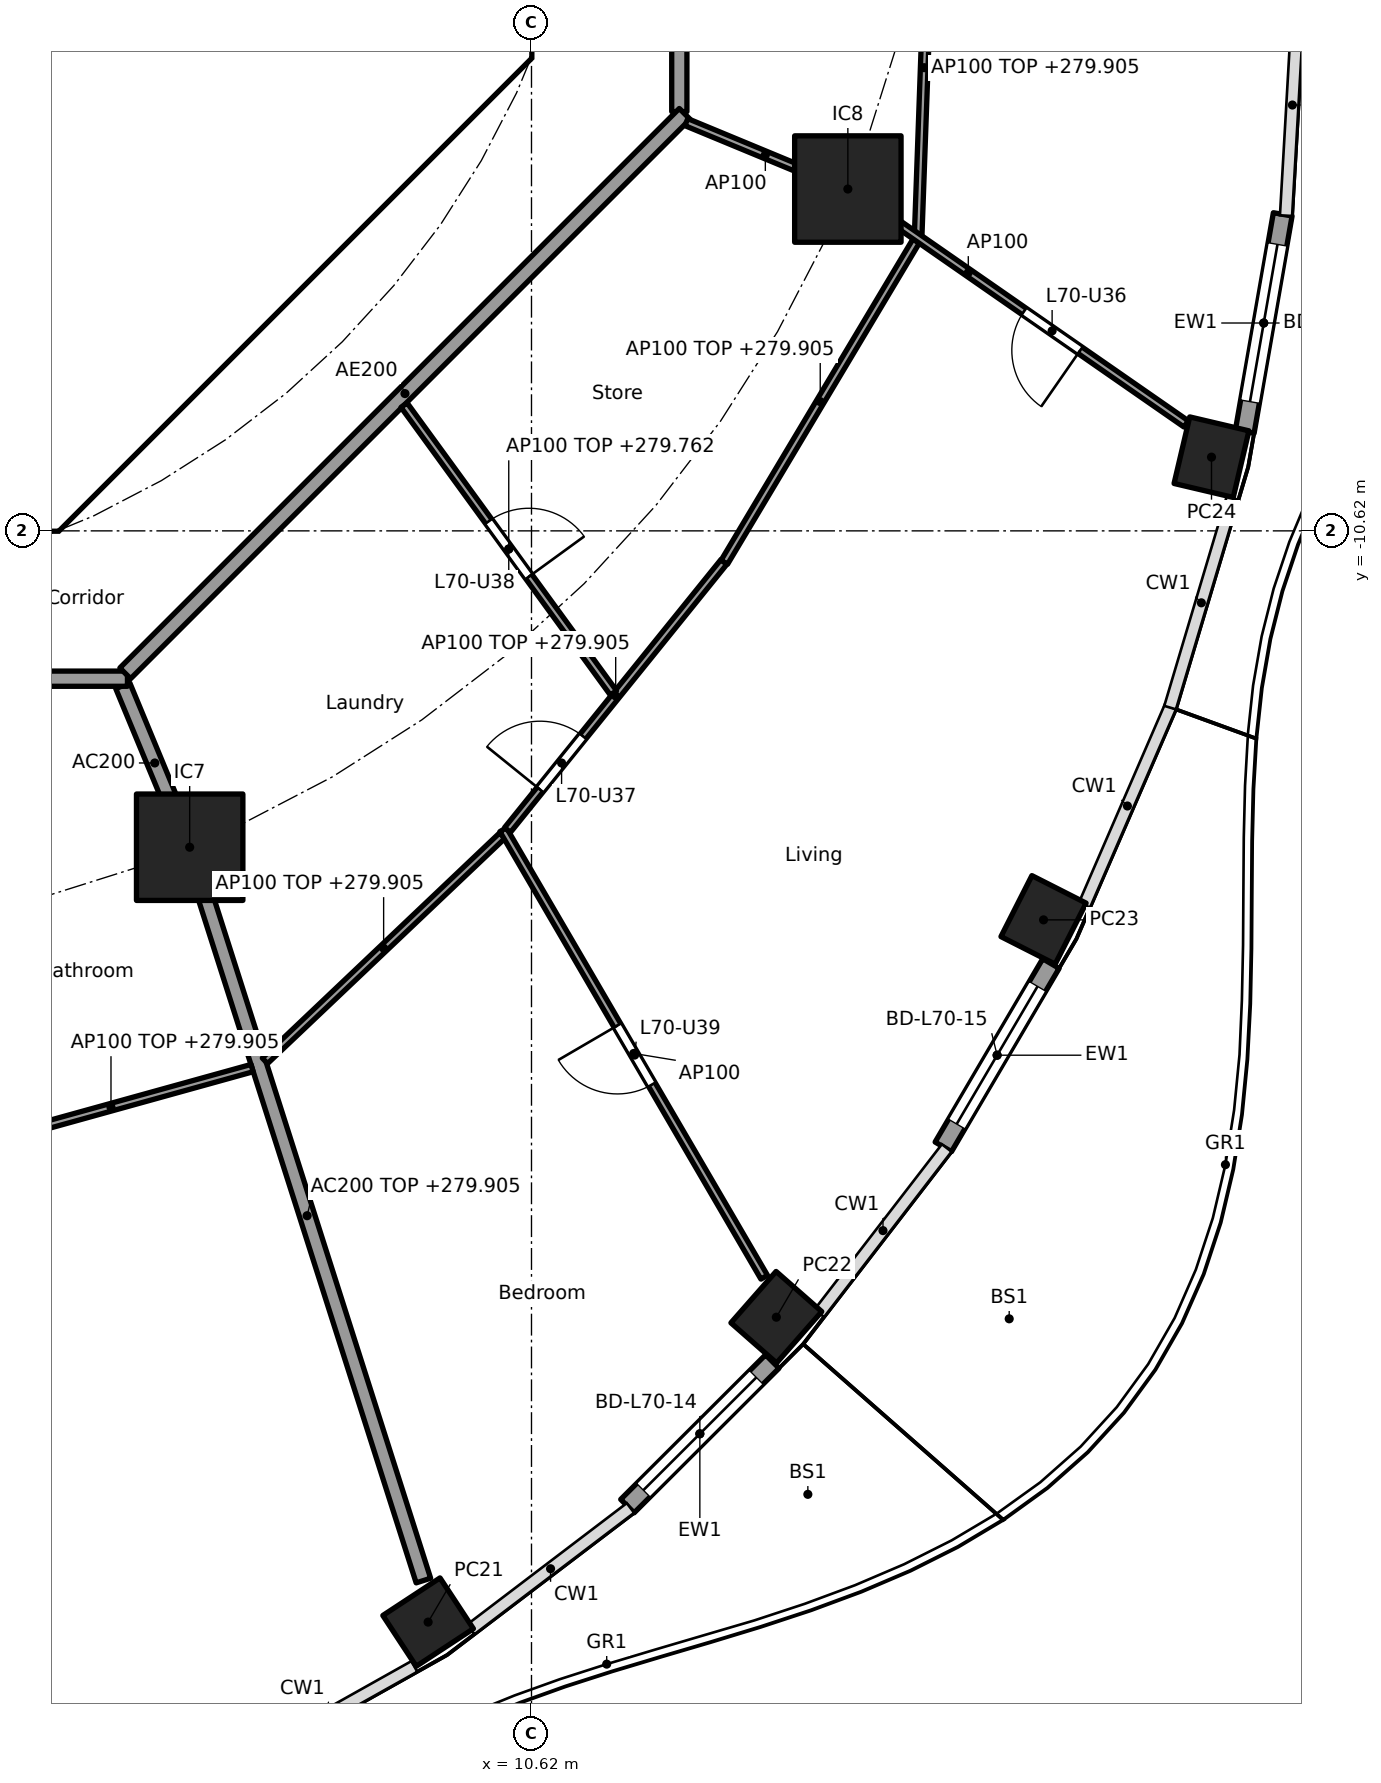
"""IFC4 building model, lengths in metres.
Left out: names, types, materials, properties, quantities, classifications, styles, units other than length and angle.
Written with IfcOpenShell. Run it as: python <this file> out.ifc"""

import sys

from ifc_helpers import new_model, si_unit, direction, frame, frame_2d, origin, origin_2d, place, context, subcontext, project, spatial, polyline, rectangle, hollow_rectangle, outline, extrude, element, fill, save


model = new_model("IFC4")
c1 = context("Model", 3, precision=1e-05, world=origin(), true_north=direction((0.0, 1.0)))
c2 = subcontext(c1, "Body", "Model", "MODEL_VIEW")
j1 = project(units=[si_unit("LENGTHUNIT", "METRE"), si_unit("PLANEANGLEUNIT", "RADIAN")], contexts=[c1])
p1 = place(None, origin())
s1 = spatial("IfcSite", under=j1, at=p1, CompositionType="ELEMENT")
p2 = place(p1, origin())
s2 = spatial("IfcBuilding", under=s1, at=p2, CompositionType="ELEMENT")
p3 = place(p2, frame((0.0, 0.0, 277.0)))
s3 = spatial("IfcBuildingStorey", under=s2, at=p3, CompositionType="ELEMENT", Elevation=277.0)
for number, where, z_axis, x_axis in (
    (1, (9.26, -24.976, 0.0), (0.0, 0.0, 1.0), (0.836, 0.549, 0.0)),
    (2, (13.841, -20.965, 0.0), (0.0, 0.0, 1.0), (0.66, 0.751, 0.0)),
    (3, (17.356, -15.738, 0.0), (0.0, 0.0, 1.0), (0.452, 0.892, 0.0)),
    (4, (19.566, -9.65, 0.0), (0.0, 0.0, 1.0), (0.229, 0.973, 0.0)),
):
    element("IfcColumn", number, at=place(p3, frame(where, z_axis=z_axis, x_axis=x_axis)), inside=s3, PredefinedType="COLUMN", context=c2, shape_type="SweptSolid", body=[
        extrude(hollow_rectangle(XDim=0.9, YDim=0.8, WallThickness=0.028, at=origin_2d()), origin(), (0.0, 0.0, 1.0), 3.7),
    ])
for number, where, z_axis, x_axis in (
    (5, (6.123, -14.782, 0.0), (0.0, 0.0, 1.0), (1.0, 0.0, 0.0)),
    (6, (14.782, -6.123, 0.0), (0.0, 0.0, 1.0), (1.0, 0.0, 0.0)),
):
    element("IfcColumn", number, at=place(p3, frame(where, z_axis=z_axis, x_axis=x_axis)), inside=s3, PredefinedType="COLUMN", context=c2, shape_type="SweptSolid", body=[
        extrude(rectangle(XDim=1.4, YDim=1.4, at=origin_2d()), origin(), (0.0, 0.0, 1.0), 3.7),
    ])
p4 = place(p3, frame((13.788, -21.548, 0.0), z_axis=(0.0, 0.0, 1.0), x_axis=(-0.707831739508, -0.706381078841, 0.0)))
e7 = element("IfcWall", 7, at=p4, inside=s3, PredefinedType="SOLIDWALL", context=c2, shape_type="SweptSolid", body=[
    extrude(rectangle(XDim=2.693, YDim=0.25, at=frame_2d((1.346, 0.0))), origin(), (0.0, 0.0, 1.0), 3.44),
])
p5 = place(p4, frame((0.296, 0.0, 0.0)))
e8 = element("IfcOpeningElement", 8, at=p5, cuts=e7, PredefinedType="OPENING", context=c2, shape_type="SweptSolid", body=[
    extrude(rectangle(XDim=2.1, YDim=2.4, at=frame_2d((1.05, 1.2))), frame((0.0, 0.135, 0.0), z_axis=(0.0, -1.0, 0.0), x_axis=(1.0, 0.0, 0.0)), (0.0, 0.0, 1.0), 0.27),
])
p6 = place(p3, frame((17.454, -16.312, 0.0), z_axis=(0.0, 0.0, 1.0), x_axis=(-0.506371364425, -0.862315511452, 0.0)))
e9 = element("IfcWall", 9, at=p6, inside=s3, PredefinedType="SOLIDWALL", context=c2, shape_type="SweptSolid", body=[
    extrude(rectangle(XDim=2.796, YDim=0.25, at=frame_2d((1.398, 0.0))), origin(), (0.0, 0.0, 1.0), 3.44),
])
p7 = place(p6, frame((0.348, 0.0, 0.0)))
e10 = element("IfcOpeningElement", 10, at=p7, cuts=e9, PredefinedType="OPENING", context=c2, shape_type="SweptSolid", body=[
    extrude(rectangle(XDim=2.1, YDim=2.4, at=frame_2d((1.05, 1.2))), frame((0.0, 0.135, 0.0), z_axis=(0.0, -1.0, 0.0), x_axis=(1.0, 0.0, 0.0)), (0.0, 0.0, 1.0), 0.27),
])
p8 = place(p3, frame((20.503, -6.456, 0.0), z_axis=(0.0, 0.0, 1.0), x_axis=(-0.172182411767, -0.985065082661, 0.0)))
e11 = element("IfcWall", 11, at=p8, inside=s3, PredefinedType="SOLIDWALL", context=c2, shape_type="SweptSolid", body=[
    extrude(rectangle(XDim=2.903, YDim=0.25, at=frame_2d((1.451, 0.0))), origin(), (0.0, 0.0, 1.0), 3.44),
])
p9 = place(p8, frame((0.401, 0.0, 0.0)))
e12 = element("IfcOpeningElement", 12, at=p9, cuts=e11, PredefinedType="OPENING", context=c2, shape_type="SweptSolid", body=[
    extrude(rectangle(XDim=2.1, YDim=2.4, at=frame_2d((1.05, 1.2))), frame((0.0, 0.135, 0.0), z_axis=(0.0, -1.0, 0.0), x_axis=(1.0, 0.0, 0.0)), (0.0, 0.0, 1.0), 0.27),
])
p10 = place(p3, frame((4.613, -9.988, 0.0), z_axis=(0.0, 0.0, 1.0), x_axis=(0.707106781187, 0.707106781187, 0.0)))
e13 = element("IfcWall", 13, at=p10, inside=s3, PredefinedType="SHEAR", context=c2, shape_type="SweptSolid", body=[
    extrude(rectangle(XDim=7.602, YDim=0.6, at=frame_2d((3.801, 0.0))), origin(), (0.0, 0.0, 1.0), 3.44),
])
p11 = place(p10, frame((3.201, 0.0, 0.0)))
e14 = element("IfcOpeningElement", 14, at=p11, cuts=e13, PredefinedType="OPENING", context=c2, shape_type="SweptSolid", body=[
    extrude(rectangle(XDim=1.2, YDim=2.1, at=frame_2d((0.6, 1.05))), frame((0.0, 0.31, 0.0), z_axis=(0.0, -1.0, 0.0), x_axis=(1.0, 0.0, 0.0)), (0.0, 0.0, 1.0), 0.62),
])
p12 = place(p3, origin())
e15 = element("IfcWall", 15, at=p12, inside=s3, PredefinedType="SHEAR", context=c2, shape_type="SweptSolid", body=[
    extrude(outline(polyline([(-4.152, -10.025), (4.152, -10.025), (4.401, -9.776), (4.825, -10.2), (4.401, -10.625), (-4.401, -10.625), (-4.825, -10.2), (-4.401, -9.776), (-4.152, -10.025)])), origin(), (0.0, 0.0, 1.0), 3.44),
])
p13 = place(p3, origin())
e16 = element("IfcWall", 16, at=p13, inside=s3, PredefinedType="SHEAR", context=c2, shape_type="SweptSolid", body=[
    extrude(outline(polyline([(9.776, -4.401), (10.025, -4.152), (10.025, -3.801), (10.025, 4.152), (9.776, 4.401), (10.2, 4.825), (10.625, 4.401), (10.625, -4.401), (10.2, -4.825), (9.776, -4.401)])), origin(), (0.0, 0.0, 1.0), 3.44),
])
p14 = place(p3, frame((5.243, -12.657, 0.0), z_axis=(0.0, 0.0, 1.0), x_axis=(0.382707856524, -0.923869415315, 0.0)))
e17 = element("IfcWall", 17, at=p14, inside=s3, PredefinedType="PARTITIONING", context=c2, shape_type="SweptSolid", body=[
    extrude(rectangle(XDim=2.2, YDim=0.2, at=frame_2d((1.1, 0.0))), origin(), (0.0, 0.0, 1.0), 3.44),
])
p15 = place(p3, frame((6.138, -14.83, 0.0), z_axis=(0.0, 0.0, 1.0), x_axis=(0.303653679037, -0.952782474234, 0.0)))
e18 = element("IfcWall", 18, at=p15, inside=s3, PredefinedType="PARTITIONING", context=c2, shape_type="SweptSolid", body=[
    extrude(rectangle(XDim=10.076, YDim=0.2, at=frame_2d((5.038, 0.0))), origin(), (0.0, 0.0, 1.0), 2.905),
])
p16 = place(p3, frame((12.565, -5.104, 0.0), z_axis=(0.0, 0.0, 1.0), x_axis=(0.0, 1.0, 0.0)))
e19 = element("IfcWall", 19, at=p16, inside=s3, PredefinedType="PARTITIONING", context=c2, shape_type="SweptSolid", body=[
    extrude(rectangle(XDim=10.209, YDim=0.2, at=frame_2d((5.104, 0.0))), origin(), (0.0, 0.0, 1.0), 3.44),
])
p17 = place(p16, frame((4.604, 0.0, 0.0)))
e20 = element("IfcOpeningElement", 20, at=p17, cuts=e19, PredefinedType="OPENING", context=c2, shape_type="SweptSolid", body=[
    extrude(rectangle(XDim=1.0, YDim=2.1, at=frame_2d((0.5, 1.05))), frame((0.0, 0.11, 0.0), z_axis=(0.0, -1.0, 0.0), x_axis=(1.0, 0.0, 0.0)), (0.0, 0.0, 1.0), 0.22),
])
p18 = place(p3, frame((-5.104, -12.565, 0.0), z_axis=(0.0, 0.0, 1.0), x_axis=(1.0, 0.0, 0.0)))
e21 = element("IfcWall", 21, at=p18, inside=s3, PredefinedType="PARTITIONING", context=c2, shape_type="SweptSolid", body=[
    extrude(rectangle(XDim=10.409, YDim=0.2, at=frame_2d((5.205, 0.0))), origin(), (0.0, 0.0, 1.0), 3.44),
])
p19 = place(p18, frame((5.906, 0.0, 0.0)))
e22 = element("IfcOpeningElement", 22, at=p19, cuts=e21, PredefinedType="OPENING", context=c2, shape_type="SweptSolid", body=[
    extrude(rectangle(XDim=1.0, YDim=2.1, at=frame_2d((0.5, 1.05))), frame((0.0, 0.11, 0.0), z_axis=(0.0, -1.0, 0.0), x_axis=(1.0, 0.0, 0.0)), (0.0, 0.0, 1.0), 0.22),
])
p20 = place(p3, frame((5.275, -12.494, 0.0), z_axis=(0.0, 0.0, 1.0), x_axis=(0.707106781187, 0.707106781187, 0.0)))
e23 = element("IfcWall", 23, at=p20, inside=s3, PredefinedType="PARTITIONING", context=c2, shape_type="SweptSolid", body=[
    extrude(rectangle(XDim=10.409, YDim=0.2, at=frame_2d((5.205, 0.0))), origin(), (0.0, 0.0, 1.0), 3.44),
])
p21 = place(p3, frame((15.865, -2.338, 0.0), z_axis=(0.0, 0.0, 1.0), x_axis=(-0.035902310383, -0.999355304238, 0.0)))
e24 = element("IfcWall", 24, at=p21, inside=s3, PredefinedType="PARTITIONING", context=c2, shape_type="SweptSolid", body=[
    extrude(rectangle(XDim=4.379, YDim=0.1, at=frame_2d((2.19, 0.0))), origin(), (0.0, 0.0, 1.0), 2.905),
])
p22 = place(p3, frame((3.231, -18.718, 0.0), z_axis=(0.0, 0.0, 1.0), x_axis=(0.963606817151, 0.267323590318, 0.0)))
e25 = element("IfcWall", 25, at=p22, inside=s3, PredefinedType="PARTITIONING", context=c2, shape_type="SweptSolid", body=[
    extrude(rectangle(XDim=3.853, YDim=0.1, at=frame_2d((1.927, 0.0))), origin(), (0.0, 0.0, 1.0), 2.905),
])
p23 = place(p3, frame((7.113, -17.592, 0.0), z_axis=(0.0, 0.0, 1.0), x_axis=(0.725433932329, 0.688291805723, 0.0)))
e26 = element("IfcWall", 26, at=p23, inside=s3, PredefinedType="PARTITIONING", context=c2, shape_type="SweptSolid", body=[
    extrude(rectangle(XDim=4.305, YDim=0.1, at=frame_2d((2.153, 0.0))), origin(), (0.0, 0.0, 1.0), 2.905),
])
p24 = place(p3, frame((10.248, -14.551, 0.0), z_axis=(0.0, 0.0, 1.0), x_axis=(0.503826483408, -0.86380488226, 0.0)))
e27 = element("IfcWall", 27, at=p24, inside=s3, PredefinedType="PARTITIONING", context=c2, shape_type="SweptSolid", body=[
    extrude(rectangle(XDim=6.816, YDim=0.1, at=frame_2d((3.408, 0.0))), origin(), (0.0, 0.0, 1.0), 3.44),
])
p25 = place(p24, frame((2.983, 0.0, 0.0)))
e28 = element("IfcOpeningElement", 28, at=p25, cuts=e27, PredefinedType="OPENING", context=c2, shape_type="SweptSolid", body=[
    extrude(rectangle(XDim=0.9, YDim=2.1, at=frame_2d((0.45, 1.05))), frame((0.0, 0.06, 0.0), z_axis=(0.0, -1.0, 0.0), x_axis=(1.0, 0.0, 0.0)), (0.0, 0.0, 1.0), 0.12),
])
p26 = place(p3, frame((10.304, -14.555, 0.0), z_axis=(0.0, 0.0, 1.0), x_axis=(0.628170338674, 0.778075848237, 0.0)))
e29 = element("IfcWall", 29, at=p26, inside=s3, PredefinedType="PARTITIONING", context=c2, shape_type="SweptSolid", body=[
    extrude(rectangle(XDim=4.532, YDim=0.1, at=frame_2d((2.266, 0.0))), origin(), (0.0, 0.0, 1.0), 2.905),
])
p27 = place(p26, frame((0.683, 0.0, 0.0)))
e30 = element("IfcOpeningElement", 30, at=p27, cuts=e29, PredefinedType="OPENING", context=c2, shape_type="SweptSolid", body=[
    extrude(rectangle(XDim=0.9, YDim=2.1, at=frame_2d((0.45, 1.05))), frame((0.0, 0.06, 0.0), z_axis=(0.0, -1.0, 0.0), x_axis=(1.0, 0.0, 0.0)), (0.0, 0.0, 1.0), 0.12),
])
p28 = place(p3, frame((8.943, -8.966, 0.0), z_axis=(0.0, 0.0, 1.0), x_axis=(0.588357698232, -0.808600778463, 0.0)))
e31 = element("IfcWall", 31, at=p28, inside=s3, PredefinedType="PARTITIONING", context=c2, shape_type="SweptSolid", body=[
    extrude(rectangle(XDim=4.682, YDim=0.1, at=frame_2d((2.341, 0.0))), origin(), (0.0, 0.0, 1.0), 2.762),
])
p29 = place(p28, frame((1.891, 0.0, 0.0)))
e32 = element("IfcOpeningElement", 32, at=p29, cuts=e31, PredefinedType="OPENING", context=c2, shape_type="SweptSolid", body=[
    extrude(rectangle(XDim=0.9, YDim=2.1, at=frame_2d((0.45, 1.05))), frame((0.0, 0.06, 0.0), z_axis=(0.0, -1.0, 0.0), x_axis=(1.0, 0.0, 0.0)), (0.0, 0.0, 1.0), 0.12),
])
p30 = place(p3, frame((13.157, -11.033, 0.0), z_axis=(0.0, 0.0, 1.0), x_axis=(0.512736548388, 0.858545998737, 0.0)))
e33 = element("IfcWall", 33, at=p30, inside=s3, PredefinedType="PARTITIONING", context=c2, shape_type="SweptSolid", body=[
    extrude(rectangle(XDim=4.922, YDim=0.1, at=frame_2d((2.461, 0.0))), origin(), (0.0, 0.0, 1.0), 2.905),
])
p31 = place(p3, frame((12.657, -5.243, 0.0), z_axis=(0.0, 0.0, 1.0), x_axis=(0.923864733477, -0.382719158442, 0.0)))
e34 = element("IfcWall", 34, at=p31, inside=s3, PredefinedType="PARTITIONING", context=c2, shape_type="SweptSolid", body=[
    extrude(rectangle(XDim=2.25, YDim=0.1, at=frame_2d((1.125, 0.0))), origin(), (0.0, 0.0, 1.0), 3.44),
])
p32 = place(p3, frame((14.823, -6.151, 0.0), z_axis=(0.0, 0.0, 1.0), x_axis=(0.821435065081, -0.570302054928, 0.0)))
e35 = element("IfcWall", 35, at=p32, inside=s3, PredefinedType="PARTITIONING", context=c2, shape_type="SweptSolid", body=[
    extrude(rectangle(XDim=5.368, YDim=0.1, at=frame_2d((2.684, 0.0))), origin(), (0.0, 0.0, 1.0), 3.44),
])
p33 = place(p32, frame((2.771, 0.0, 0.0)))
e36 = element("IfcOpeningElement", 36, at=p33, cuts=e35, PredefinedType="OPENING", context=c2, shape_type="SweptSolid", body=[
    extrude(rectangle(XDim=0.9, YDim=2.1, at=frame_2d((0.45, 1.05))), frame((0.0, 0.06, 0.0), z_axis=(0.0, -1.0, 0.0), x_axis=(1.0, 0.0, 0.0)), (0.0, 0.0, 1.0), 0.12),
])
p34 = place(p5, origin())
e37 = element("IfcDoor", 37, at=p34, inside=s3, OperationType="SLIDING_TO_LEFT", PredefinedType="DOOR", context=c2, shape_type="SweptSolid", body=[
    extrude(rectangle(XDim=2.1, YDim=2.4, at=frame_2d((1.05, 1.2))), frame((0.0, 0.025, 0.0), z_axis=(0.0, -1.0, 0.0), x_axis=(1.0, 0.0, 0.0)), (0.0, 0.0, 1.0), 0.05),
])
fill(e8, e37)
p35 = place(p7, origin())
e38 = element("IfcDoor", 38, at=p35, inside=s3, OperationType="SLIDING_TO_LEFT", PredefinedType="DOOR", context=c2, shape_type="SweptSolid", body=[
    extrude(rectangle(XDim=2.1, YDim=2.4, at=frame_2d((1.05, 1.2))), frame((0.0, 0.025, 0.0), z_axis=(0.0, -1.0, 0.0), x_axis=(1.0, 0.0, 0.0)), (0.0, 0.0, 1.0), 0.05),
])
fill(e10, e38)
p36 = place(p9, origin())
e39 = element("IfcDoor", 39, at=p36, inside=s3, OperationType="SLIDING_TO_LEFT", PredefinedType="DOOR", context=c2, shape_type="SweptSolid", body=[
    extrude(rectangle(XDim=2.1, YDim=2.4, at=frame_2d((1.05, 1.2))), frame((0.0, 0.025, 0.0), z_axis=(0.0, -1.0, 0.0), x_axis=(1.0, 0.0, 0.0)), (0.0, 0.0, 1.0), 0.05),
])
fill(e12, e39)
p37 = place(p11, origin())
e40 = element("IfcDoor", 40, at=p37, inside=s3, OperationType="SINGLE_SWING_RIGHT", PredefinedType="DOOR", context=c2, shape_type="SweptSolid", body=[
    extrude(rectangle(XDim=1.2, YDim=2.1, at=frame_2d((0.6, 1.05))), frame((0.0, 0.025, 0.0), z_axis=(0.0, -1.0, 0.0), x_axis=(1.0, 0.0, 0.0)), (0.0, 0.0, 1.0), 0.05),
])
fill(e14, e40)
p38 = place(p33, frame((0.9, 0.0, 0.0), x_axis=(-1.0, 0.0, 0.0)))
e41 = element("IfcDoor", 41, at=p38, inside=s3, OperationType="SINGLE_SWING_LEFT", PredefinedType="DOOR", context=c2, shape_type="SweptSolid", body=[
    extrude(rectangle(XDim=0.9, YDim=2.1, at=frame_2d((0.45, 1.05))), frame((0.0, 0.025, 0.0), z_axis=(0.0, -1.0, 0.0), x_axis=(1.0, 0.0, 0.0)), (0.0, 0.0, 1.0), 0.05),
])
fill(e36, e41)
p39 = place(p27, origin())
e42 = element("IfcDoor", 42, at=p39, inside=s3, OperationType="SINGLE_SWING_LEFT", PredefinedType="DOOR", context=c2, shape_type="SweptSolid", body=[
    extrude(rectangle(XDim=0.9, YDim=2.1, at=frame_2d((0.45, 1.05))), frame((0.0, 0.025, 0.0), z_axis=(0.0, -1.0, 0.0), x_axis=(1.0, 0.0, 0.0)), (0.0, 0.0, 1.0), 0.05),
])
fill(e30, e42)
p40 = place(p29, origin())
e43 = element("IfcDoor", 43, at=p40, inside=s3, OperationType="SINGLE_SWING_RIGHT", PredefinedType="DOOR", context=c2, shape_type="SweptSolid", body=[
    extrude(rectangle(XDim=0.9, YDim=2.1, at=frame_2d((0.45, 1.05))), frame((0.0, 0.025, 0.0), z_axis=(0.0, -1.0, 0.0), x_axis=(1.0, 0.0, 0.0)), (0.0, 0.0, 1.0), 0.05),
])
fill(e32, e43)
p41 = place(p25, frame((0.9, 0.0, 0.0), x_axis=(-1.0, 0.0, 0.0)))
e44 = element("IfcDoor", 44, at=p41, inside=s3, OperationType="SINGLE_SWING_RIGHT", PredefinedType="DOOR", context=c2, shape_type="SweptSolid", body=[
    extrude(rectangle(XDim=0.9, YDim=2.1, at=frame_2d((0.45, 1.05))), frame((0.0, 0.025, 0.0), z_axis=(0.0, -1.0, 0.0), x_axis=(1.0, 0.0, 0.0)), (0.0, 0.0, 1.0), 0.05),
])
fill(e28, e44)
save(model, sys.argv[1])
